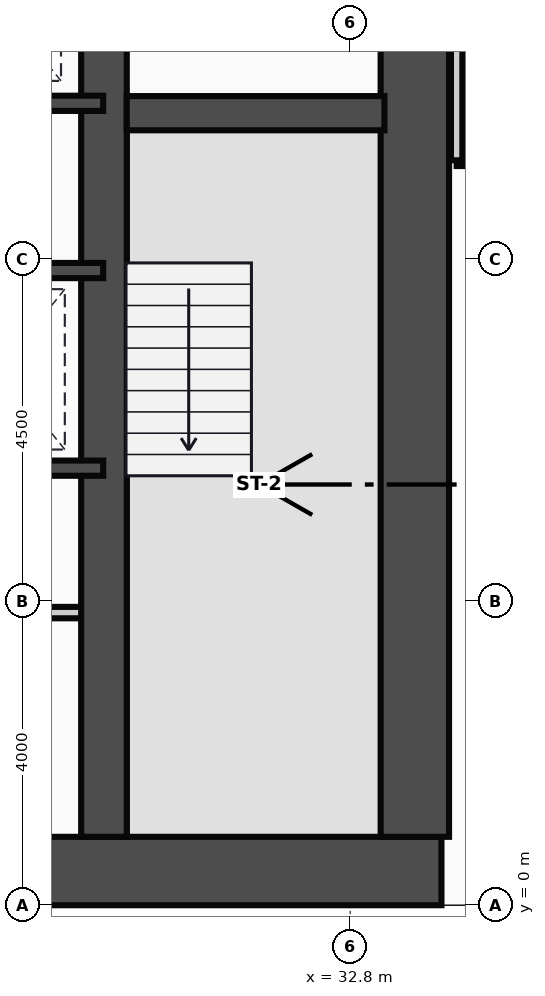
"""IFC4 building model, lengths in metres.
Left out: names, types, materials, properties, quantities, classifications, styles, units other than length and angle.
Written with IfcOpenShell. Run it as: python <this file> out.ifc"""

import sys

from ifc_helpers import new_model, si_unit, direction, frame, frame_2d, origin, place, context, subcontext, project, spatial, rectangle, extrude, source, transform, mapped, element, fill, save


model = new_model("IFC4")
c1 = context("Model", 3, precision=1e-05, world=origin(), true_north=direction((0.0, 1.0)))
c2 = subcontext(c1, "Body", "Model", "MODEL_VIEW")
j1 = project(units=[si_unit("LENGTHUNIT", "METRE"), si_unit("PLANEANGLEUNIT", "RADIAN")], contexts=[c1])
p1 = place(None, origin())
s1 = spatial("IfcSite", under=j1, at=p1, CompositionType="ELEMENT")
p2 = place(p1, origin())
s2 = spatial("IfcBuilding", under=s1, at=p2, CompositionType="ELEMENT")
p3 = place(p2, frame((0.0, 0.0, 32.5)))
s3 = spatial("IfcBuildingStorey", under=s2, at=p3, CompositionType="ELEMENT", Elevation=32.5)
m1 = source(origin(), c2, "Body", "SweptSolid", [
    extrude(rectangle(XDim=29.5, YDim=0.9, at=frame_2d((14.75, 0.0))), origin(), (0.0, 0.0, 1.0), 3.65),
])
p4 = place(p3, frame((4.5, 0.45, 0.0), z_axis=(0.0, 0.0, 1.0), x_axis=(1.0, 0.0, 0.0)))
e1 = element("IfcWall", 1, at=p4, inside=s3, PredefinedType="SHEAR", context=c2, shape_type="MappedRepresentation", body=[
    mapped(m1, transform((0.0, 0.0, 0.0))),
])
m2 = source(origin(), c2, "Body", "SweptSolid", [
    extrude(rectangle(XDim=13.1, YDim=0.9, at=frame_2d((6.55, 0.0))), origin(), (0.0, 0.0, 1.0), 3.65),
])
p5 = place(p3, frame((33.65, 0.9, 0.0), z_axis=(0.0, 0.0, 1.0), x_axis=(0.0, 1.0, 0.0)))
e2 = element("IfcWall", 2, at=p5, inside=s3, PredefinedType="SHEAR", context=c2, shape_type="MappedRepresentation", body=[
    mapped(m2, transform((0.0, 0.0, 0.0))),
])
m3 = source(origin(), c2, "Body", "SweptSolid", [
    extrude(rectangle(XDim=12.2, YDim=0.6, at=frame_2d((6.1, 0.0))), origin(), (0.0, 0.0, 1.0), 3.65),
])
p6 = place(p3, frame((29.56, 0.9, 0.0), z_axis=(0.0, 0.0, 1.0), x_axis=(0.0, 1.0, 0.0)))
e3 = element("IfcWall", 3, at=p6, inside=s3, PredefinedType="SHEAR", context=c2, shape_type="MappedRepresentation", body=[
    mapped(m3, transform((0.0, 0.0, 0.0))),
])
m4 = source(origin(), c2, "Body", "SweptSolid", [
    extrude(rectangle(XDim=3.39, YDim=0.45, at=frame_2d((1.695, 0.0))), origin(), (0.0, 0.0, 1.0), 3.65),
])
p7 = place(p3, frame((29.86, 10.42, 0.0), z_axis=(0.0, 0.0, 1.0), x_axis=(1.0, 0.0, 0.0)))
e4 = element("IfcWall", 4, at=p7, inside=s3, PredefinedType="SHEAR", context=c2, shape_type="MappedRepresentation", body=[
    mapped(m4, transform((0.0, 0.0, 0.0))),
])
p8 = place(p7, frame((1.1, 0.0, 0.0)))
e5 = element("IfcOpeningElement", 5, at=p8, cuts=e4, PredefinedType="OPENING", context=c2, shape_type="SweptSolid", body=[
    extrude(rectangle(XDim=1.1, YDim=2.15, at=frame_2d((0.55, 1.075))), frame((0.0, 0.235, 0.0), z_axis=(0.0, -1.0, 0.0), x_axis=(1.0, 0.0, 0.0)), (0.0, 0.0, 1.0), 0.47),
])
m5 = source(origin(), c2, "Body", "SweptSolid", [
    extrude(rectangle(XDim=8.8, YDim=0.2, at=frame_2d((4.4, 0.0))), origin(), (0.0, 0.0, 1.0), 3.4),
])
p9 = place(p3, frame((20.75, 10.55, 0.0), z_axis=(0.0, 0.0, 1.0), x_axis=(1.0, 0.0, 0.0)))
e6 = element("IfcWall", 6, at=p9, inside=s3, PredefinedType="PARTITIONING", context=c2, shape_type="MappedRepresentation", body=[
    mapped(m5, transform((0.0, 0.0, 0.0))),
])
m6 = source(origin(), c2, "Body", "SweptSolid", [
    extrude(rectangle(XDim=4.55, YDim=0.2, at=frame_2d((2.275, 0.0))), origin(), (0.0, 0.0, 1.0), 3.4),
])
for number, where, z_axis, x_axis in (
    (7, (25.0, 8.35, 0.0), (0.0, 0.0, 1.0), (1.0, 0.0, 0.0)),
    (8, (25.0, 5.75, 0.0), (0.0, 0.0, 1.0), (1.0, 0.0, 0.0)),
):
    element("IfcWall", number, at=place(p3, frame(where, z_axis=z_axis, x_axis=x_axis)), inside=s3, PredefinedType="PARTITIONING", context=c2, shape_type="MappedRepresentation", body=[
        mapped(m6, transform((0.0, 0.0, 0.0))),
    ])
m7 = source(origin(), c2, "Body", "SweptSolid", [
    extrude(rectangle(XDim=4.55, YDim=0.15, at=frame_2d((2.275, 0.0))), origin(), (0.0, 0.0, 1.0), 3.4),
])
p10 = place(p3, frame((25.0, 3.85, 0.0), z_axis=(0.0, 0.0, 1.0), x_axis=(1.0, 0.0, 0.0)))
e9 = element("IfcWall", 9, at=p10, inside=s3, PredefinedType="PARTITIONING", context=c2, shape_type="MappedRepresentation", body=[
    mapped(m7, transform((0.0, 0.0, 0.0))),
])
m8 = source(origin(), c2, "Body", "SweptSolid", [
    extrude(rectangle(XDim=4.8, YDim=0.15, at=frame_2d((2.4, 0.0))), origin(), (0.0, 0.0, 1.0), 3.4),
])
p11 = place(p3, frame((34.2, 9.8, 0.0), z_axis=(0.0, 0.0, 1.0), x_axis=(1.0, 0.0, 0.0)))
e10 = element("IfcWall", 10, at=p11, inside=s3, PredefinedType="PARTITIONING", context=c2, shape_type="MappedRepresentation", body=[
    mapped(m8, transform((0.0, 0.0, 0.0))),
])
m9 = source(origin(), c2, "Body", "SweptSolid", [
    extrude(rectangle(XDim=4.18, YDim=0.15, at=frame_2d((2.09, 0.0))), origin(), (0.0, 0.0, 1.0), 3.4),
])
p12 = place(p3, frame((34.2, 9.8, 0.0), z_axis=(0.0, 0.0, 1.0), x_axis=(0.0, 1.0, 0.0)))
e11 = element("IfcWall", 11, at=p12, inside=s3, PredefinedType="PARTITIONING", context=c2, shape_type="MappedRepresentation", body=[
    mapped(m9, transform((0.0, 0.0, 0.0))),
])
m10 = source(origin(), c2, "Body", "SweptSolid", [
    extrude(rectangle(XDim=1.1, YDim=2.15, at=frame_2d((0.55, 1.075))), frame((0.0, 0.025, 0.0), z_axis=(0.0, -1.0, 0.0), x_axis=(1.0, 0.0, 0.0)), (0.0, 0.0, 1.0), 0.05),
])
p13 = place(p8, frame((1.1, 0.0, 0.0), z_axis=(0.0, 0.0, 1.0), x_axis=(-1.0, 0.0, 0.0)))
e12 = element("IfcDoor", 12, at=p13, inside=s3, OperationType="SINGLE_SWING_RIGHT", PredefinedType="DOOR", context=c2, shape_type="MappedRepresentation", body=[
    mapped(m10, transform((0.0, 0.0, 0.0))),
])
fill(e5, e12)
save(model, sys.argv[1])
